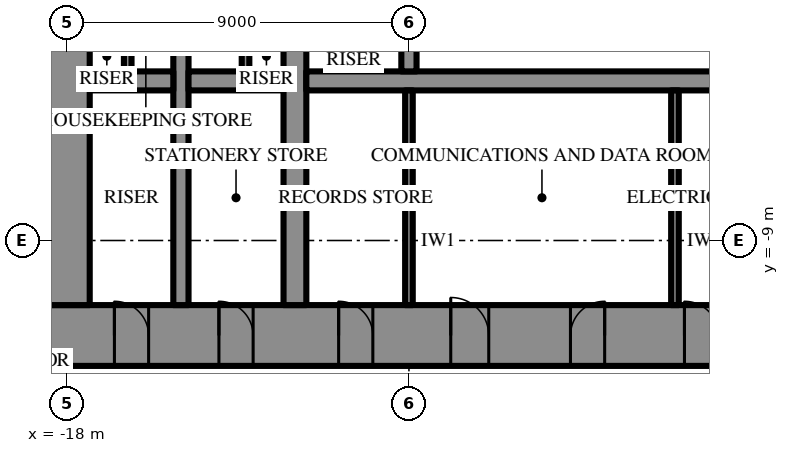
"""IFC4 building model, lengths in metres.
Left out: names, types, materials, properties, quantities, classifications, styles, units other than length and angle.
Written with IfcOpenShell. Run it as: python <this file> out.ifc"""

import sys

from ifc_helpers import new_model, si_unit, direction, frame, frame_2d, origin, place, context, subcontext, project, spatial, rectangle, extrude, element, fill, save


model = new_model("IFC4")
c1 = context("Model", 3, precision=1e-05, world=origin(), true_north=direction((0.0, 1.0)))
c2 = subcontext(c1, "Body", "Model", "MODEL_VIEW")
j1 = project(units=[si_unit("LENGTHUNIT", "METRE"), si_unit("PLANEANGLEUNIT", "RADIAN")], contexts=[c1])
p1 = place(None, origin())
s1 = spatial("IfcSite", under=j1, at=p1, CompositionType="ELEMENT")
p2 = place(p1, origin())
s2 = spatial("IfcBuilding", under=s1, at=p2, CompositionType="ELEMENT")
p3 = place(p2, frame((0.0, 0.0, -9.0)))
s3 = spatial("IfcBuildingStorey", under=s2, at=p3, CompositionType="ELEMENT", Elevation=-9.0)
p4 = place(p3, frame((18.6, -11.5, 0.0), z_axis=(0.0, 0.0, 1.0), x_axis=(-1.0, 0.0, 0.0)))
e1 = element("IfcWall", 1, at=p4, inside=s3, PredefinedType="SHEAR", context=c2, shape_type="SweptSolid", body=[
    extrude(rectangle(XDim=37.2, YDim=1.6, at=frame_2d((18.6, 0.0))), origin(), (0.0, 0.0, 1.0), 4.5),
])
p5 = place(p4, frame((19.45, 0.0, 0.0)))
e2 = element("IfcOpeningElement", 2, at=p5, cuts=e1, PredefinedType="OPENING", context=c2, shape_type="SweptSolid", body=[
    extrude(rectangle(XDim=0.9, YDim=2.2, at=frame_2d((0.45, 1.1))), frame((0.0, 0.81, 0.0), z_axis=(0.0, -1.0, 0.0), x_axis=(1.0, 0.0, 0.0)), (0.0, 0.0, 1.0), 1.62),
])
p6 = place(p4, frame((22.45, 0.0, 0.0)))
e3 = element("IfcOpeningElement", 3, at=p6, cuts=e1, PredefinedType="OPENING", context=c2, shape_type="SweptSolid", body=[
    extrude(rectangle(XDim=0.9, YDim=2.2, at=frame_2d((0.45, 1.1))), frame((0.0, 0.81, 0.0), z_axis=(0.0, -1.0, 0.0), x_axis=(1.0, 0.0, 0.0)), (0.0, 0.0, 1.0), 1.62),
])
p7 = place(p4, frame((25.5, 0.0, 0.0)))
e4 = element("IfcOpeningElement", 4, at=p7, cuts=e1, PredefinedType="OPENING", context=c2, shape_type="SweptSolid", body=[
    extrude(rectangle(XDim=1.0, YDim=2.2, at=frame_2d((0.5, 1.1))), frame((0.0, 0.81, 0.0), z_axis=(0.0, -1.0, 0.0), x_axis=(1.0, 0.0, 0.0)), (0.0, 0.0, 1.0), 1.62),
])
p8 = place(p4, frame((1.85, 0.0, 0.0)))
e5 = element("IfcOpeningElement", 5, at=p8, cuts=e1, PredefinedType="OPENING", context=c2, shape_type="SweptSolid", body=[
    extrude(rectangle(XDim=0.9, YDim=2.2, at=frame_2d((0.45, 1.1))), frame((0.0, 0.81, 0.0), z_axis=(0.0, -1.0, 0.0), x_axis=(1.0, 0.0, 0.0)), (0.0, 0.0, 1.0), 1.62),
])
p9 = place(p4, frame((4.6, 0.0, 0.0)))
e6 = element("IfcOpeningElement", 6, at=p9, cuts=e1, PredefinedType="OPENING", context=c2, shape_type="SweptSolid", body=[
    extrude(rectangle(XDim=0.9, YDim=2.2, at=frame_2d((0.45, 1.1))), frame((0.0, 0.81, 0.0), z_axis=(0.0, -1.0, 0.0), x_axis=(1.0, 0.0, 0.0)), (0.0, 0.0, 1.0), 1.62),
])
p10 = place(p4, frame((7.75, 0.0, 0.0)))
e7 = element("IfcOpeningElement", 7, at=p10, cuts=e1, PredefinedType="OPENING", context=c2, shape_type="SweptSolid", body=[
    extrude(rectangle(XDim=0.9, YDim=2.2, at=frame_2d((0.45, 1.1))), frame((0.0, 0.81, 0.0), z_axis=(0.0, -1.0, 0.0), x_axis=(1.0, 0.0, 0.0)), (0.0, 0.0, 1.0), 1.62),
])
p11 = place(p4, frame((28.55, 0.0, 0.0)))
e8 = element("IfcOpeningElement", 8, at=p11, cuts=e1, PredefinedType="OPENING", context=c2, shape_type="SweptSolid", body=[
    extrude(rectangle(XDim=0.9, YDim=2.2, at=frame_2d((0.45, 1.1))), frame((0.0, 0.81, 0.0), z_axis=(0.0, -1.0, 0.0), x_axis=(1.0, 0.0, 0.0)), (0.0, 0.0, 1.0), 1.62),
])
p12 = place(p4, frame((31.7, 0.0, 0.0)))
e9 = element("IfcOpeningElement", 9, at=p12, cuts=e1, PredefinedType="OPENING", context=c2, shape_type="SweptSolid", body=[
    extrude(rectangle(XDim=0.9, YDim=2.2, at=frame_2d((0.45, 1.1))), frame((0.0, 0.81, 0.0), z_axis=(0.0, -1.0, 0.0), x_axis=(1.0, 0.0, 0.0)), (0.0, 0.0, 1.0), 1.62),
])
p13 = place(p4, frame((34.45, 0.0, 0.0)))
e10 = element("IfcOpeningElement", 10, at=p13, cuts=e1, PredefinedType="OPENING", context=c2, shape_type="SweptSolid", body=[
    extrude(rectangle(XDim=0.9, YDim=2.2, at=frame_2d((0.45, 1.1))), frame((0.0, 0.81, 0.0), z_axis=(0.0, -1.0, 0.0), x_axis=(1.0, 0.0, 0.0)), (0.0, 0.0, 1.0), 1.62),
])
p14 = place(p3, frame((-18.0, 10.7, 0.0), z_axis=(0.0, 0.0, 1.0), x_axis=(0.0, -1.0, 0.0)))
e11 = element("IfcWall", 11, at=p14, inside=s3, PredefinedType="SHEAR", context=c2, shape_type="SweptSolid", body=[
    extrude(rectangle(XDim=21.4, YDim=1.2, at=frame_2d((10.7, 0.0))), origin(), (0.0, 0.0, 1.0), 4.5),
])
p15 = place(p14, frame((9.8, 0.0, 0.0)))
e12 = element("IfcOpeningElement", 12, at=p15, cuts=e11, PredefinedType="OPENING", context=c2, shape_type="SweptSolid", body=[
    extrude(rectangle(XDim=1.8, YDim=2.4, at=frame_2d((0.9, 1.2))), frame((0.0, 0.61, 0.0), z_axis=(0.0, -1.0, 0.0), x_axis=(1.0, 0.0, 0.0)), (0.0, 0.0, 1.0), 1.22),
])
p16 = place(p3, frame((-12.0, -10.7, 0.0), z_axis=(0.0, 0.0, 1.0), x_axis=(0.0, 1.0, 0.0)))
e13 = element("IfcWall", 13, at=p16, inside=s3, PredefinedType="SHEAR", context=c2, shape_type="SweptSolid", body=[
    extrude(rectangle(XDim=21.4, YDim=0.6, at=frame_2d((10.7, 0.0))), origin(), (0.0, 0.0, 1.0), 4.5),
])
p17 = place(p16, frame((9.8, 0.0, 0.0)))
e14 = element("IfcOpeningElement", 14, at=p17, cuts=e13, PredefinedType="OPENING", context=c2, shape_type="SweptSolid", body=[
    extrude(rectangle(XDim=1.8, YDim=2.4, at=frame_2d((0.9, 1.2))), frame((0.0, 0.31, 0.0), z_axis=(0.0, -1.0, 0.0), x_axis=(1.0, 0.0, 0.0)), (0.0, 0.0, 1.0), 0.62),
])
p18 = place(p3, frame((-15.0, -10.7, 0.0), z_axis=(0.0, 0.0, 1.0), x_axis=(0.0, 1.0, 0.0)))
e15 = element("IfcWall", 15, at=p18, inside=s3, PredefinedType="SHEAR", context=c2, shape_type="SweptSolid", body=[
    extrude(rectangle(XDim=21.4, YDim=0.4, at=frame_2d((10.7, 0.0))), origin(), (0.0, 0.0, 1.0), 4.5),
])
p19 = place(p18, frame((9.8, 0.0, 0.0)))
e16 = element("IfcOpeningElement", 16, at=p19, cuts=e15, PredefinedType="OPENING", context=c2, shape_type="SweptSolid", body=[
    extrude(rectangle(XDim=1.8, YDim=2.4, at=frame_2d((0.9, 1.2))), frame((0.0, 0.21, 0.0), z_axis=(0.0, -1.0, 0.0), x_axis=(1.0, 0.0, 0.0)), (0.0, 0.0, 1.0), 0.42),
])
p20 = place(p3, frame((11.7, -4.8, 0.0), z_axis=(0.0, 0.0, 1.0), x_axis=(-1.0, 0.0, 0.0)))
e17 = element("IfcWall", 17, at=p20, inside=s3, PredefinedType="SHEAR", context=c2, shape_type="SweptSolid", body=[
    extrude(rectangle(XDim=23.4, YDim=0.5, at=frame_2d((11.7, 0.0))), origin(), (0.0, 0.0, 1.0), 4.5),
])
p21 = place(p20, frame((6.6, 0.0, 0.0)))
e18 = element("IfcOpeningElement", 18, at=p21, cuts=e17, PredefinedType="OPENING", context=c2, shape_type="SweptSolid", body=[
    extrude(rectangle(XDim=1.2, YDim=2.2, at=frame_2d((0.6, 1.1))), frame((0.0, 0.26, 0.0), z_axis=(0.0, -1.0, 0.0), x_axis=(1.0, 0.0, 0.0)), (0.0, 0.0, 1.0), 0.52),
])
p22 = place(p20, frame((3.6, 0.0, 0.0)))
e19 = element("IfcOpeningElement", 19, at=p22, cuts=e17, PredefinedType="OPENING", context=c2, shape_type="SweptSolid", body=[
    extrude(rectangle(XDim=1.2, YDim=2.2, at=frame_2d((0.6, 1.1))), frame((0.0, 0.26, 0.0), z_axis=(0.0, -1.0, 0.0), x_axis=(1.0, 0.0, 0.0)), (0.0, 0.0, 1.0), 0.52),
])
p23 = place(p3, frame((-12.3, -4.8, 0.0), z_axis=(0.0, 0.0, 1.0), x_axis=(-1.0, 0.0, 0.0)))
e20 = element("IfcWall", 20, at=p23, inside=s3, PredefinedType="SHEAR", context=c2, shape_type="SweptSolid", body=[
    extrude(rectangle(XDim=2.5, YDim=0.5, at=frame_2d((1.25, 0.0))), origin(), (0.0, 0.0, 1.0), 4.5),
])
p24 = place(p3, frame((-15.2, -4.8, 0.0), z_axis=(0.0, 0.0, 1.0), x_axis=(-1.0, 0.0, 0.0)))
e21 = element("IfcWall", 21, at=p24, inside=s3, PredefinedType="SHEAR", context=c2, shape_type="SweptSolid", body=[
    extrude(rectangle(XDim=2.2, YDim=0.5, at=frame_2d((1.1, 0.0))), origin(), (0.0, 0.0, 1.0), 4.5),
])
p25 = place(p3, frame((-9.0, -2.25, 0.0), z_axis=(0.0, 0.0, 1.0), x_axis=(0.0, -1.0, 0.0)))
e22 = element("IfcWall", 22, at=p25, inside=s3, PredefinedType="SHEAR", context=c2, shape_type="SweptSolid", body=[
    extrude(rectangle(XDim=2.3, YDim=0.4, at=frame_2d((1.15, 0.0))), origin(), (0.0, 0.0, 1.0), 4.5),
])
for number, where, z_axis, x_axis in (
    (23, (-9.0, -5.05, 0.0), (0.0, 0.0, 1.0), (0.0, -1.0, 0.0)),
    (24, (-2.0, -5.05, 0.0), (0.0, 0.0, 1.0), (0.0, -1.0, 0.0)),
):
    element("IfcWall", number, at=place(p3, frame(where, z_axis=z_axis, x_axis=x_axis)), inside=s3, PredefinedType="PARTITIONING", context=c2, shape_type="SweptSolid", body=[
        extrude(rectangle(XDim=5.65, YDim=0.2, at=frame_2d((2.825, 0.0))), origin(), (0.0, 0.0, 1.0), 4.15),
    ])
for number, where, z_axis, x_axis in (
    (25, (-13.3, -3.55, 0.0), (0.0, 0.0, 1.0), (0.0, -1.0, 0.0)),
    (26, (-16.4, -3.55, 0.0), (0.0, 0.0, 1.0), (0.0, -1.0, 0.0)),
):
    element("IfcWall", number, at=place(p3, frame(where, z_axis=z_axis, x_axis=x_axis)), inside=s3, PredefinedType="PARTITIONING", context=c2, shape_type="SweptSolid", body=[
        extrude(rectangle(XDim=1.0, YDim=0.2, at=frame_2d((0.5, 0.0))), origin(), (0.0, 0.0, 1.0), 4.15),
    ])
p26 = place(p5, frame((0.9, 0.0, 0.0), z_axis=(0.0, 0.0, 1.0), x_axis=(-1.0, 0.0, 0.0)))
e27 = element("IfcDoor", 27, at=p26, inside=s3, OperationType="SINGLE_SWING_RIGHT", PredefinedType="DOOR", context=c2, shape_type="SweptSolid", body=[
    extrude(rectangle(XDim=0.9, YDim=2.2, at=frame_2d((0.45, 1.1))), frame((0.0, 0.025, 0.0), z_axis=(0.0, -1.0, 0.0), x_axis=(1.0, 0.0, 0.0)), (0.0, 0.0, 1.0), 0.05),
])
fill(e2, e27)
p27 = place(p6, frame((0.9, 0.0, 0.0), z_axis=(0.0, 0.0, 1.0), x_axis=(-1.0, 0.0, 0.0)))
e28 = element("IfcDoor", 28, at=p27, inside=s3, OperationType="SINGLE_SWING_LEFT", PredefinedType="DOOR", context=c2, shape_type="SweptSolid", body=[
    extrude(rectangle(XDim=0.9, YDim=2.2, at=frame_2d((0.45, 1.1))), frame((0.0, 0.025, 0.0), z_axis=(0.0, -1.0, 0.0), x_axis=(1.0, 0.0, 0.0)), (0.0, 0.0, 1.0), 0.05),
])
fill(e3, e28)
p28 = place(p7, frame((1.0, 0.0, 0.0), z_axis=(0.0, 0.0, 1.0), x_axis=(-1.0, 0.0, 0.0)))
e29 = element("IfcDoor", 29, at=p28, inside=s3, OperationType="SINGLE_SWING_RIGHT", PredefinedType="DOOR", context=c2, shape_type="SweptSolid", body=[
    extrude(rectangle(XDim=1.0, YDim=2.2, at=frame_2d((0.5, 1.1))), frame((0.0, 0.025, 0.0), z_axis=(0.0, -1.0, 0.0), x_axis=(1.0, 0.0, 0.0)), (0.0, 0.0, 1.0), 0.05),
])
fill(e4, e29)
p29 = place(p11, frame((0.9, 0.0, 0.0), z_axis=(0.0, 0.0, 1.0), x_axis=(-1.0, 0.0, 0.0)))
e30 = element("IfcDoor", 30, at=p29, inside=s3, OperationType="SINGLE_SWING_RIGHT", PredefinedType="DOOR", context=c2, shape_type="SweptSolid", body=[
    extrude(rectangle(XDim=0.9, YDim=2.2, at=frame_2d((0.45, 1.1))), frame((0.0, 0.025, 0.0), z_axis=(0.0, -1.0, 0.0), x_axis=(1.0, 0.0, 0.0)), (0.0, 0.0, 1.0), 0.05),
])
fill(e8, e30)
p30 = place(p12, frame((0.9, 0.0, 0.0), z_axis=(0.0, 0.0, 1.0), x_axis=(-1.0, 0.0, 0.0)))
e31 = element("IfcDoor", 31, at=p30, inside=s3, OperationType="SINGLE_SWING_RIGHT", PredefinedType="DOOR", context=c2, shape_type="SweptSolid", body=[
    extrude(rectangle(XDim=0.9, YDim=2.2, at=frame_2d((0.45, 1.1))), frame((0.0, 0.025, 0.0), z_axis=(0.0, -1.0, 0.0), x_axis=(1.0, 0.0, 0.0)), (0.0, 0.0, 1.0), 0.05),
])
fill(e9, e31)
p31 = place(p13, frame((0.9, 0.0, 0.0), z_axis=(0.0, 0.0, 1.0), x_axis=(-1.0, 0.0, 0.0)))
e32 = element("IfcDoor", 32, at=p31, inside=s3, OperationType="SINGLE_SWING_RIGHT", PredefinedType="DOOR", context=c2, shape_type="SweptSolid", body=[
    extrude(rectangle(XDim=0.9, YDim=2.2, at=frame_2d((0.45, 1.1))), frame((0.0, 0.025, 0.0), z_axis=(0.0, -1.0, 0.0), x_axis=(1.0, 0.0, 0.0)), (0.0, 0.0, 1.0), 0.05),
])
fill(e10, e32)
save(model, sys.argv[1])
